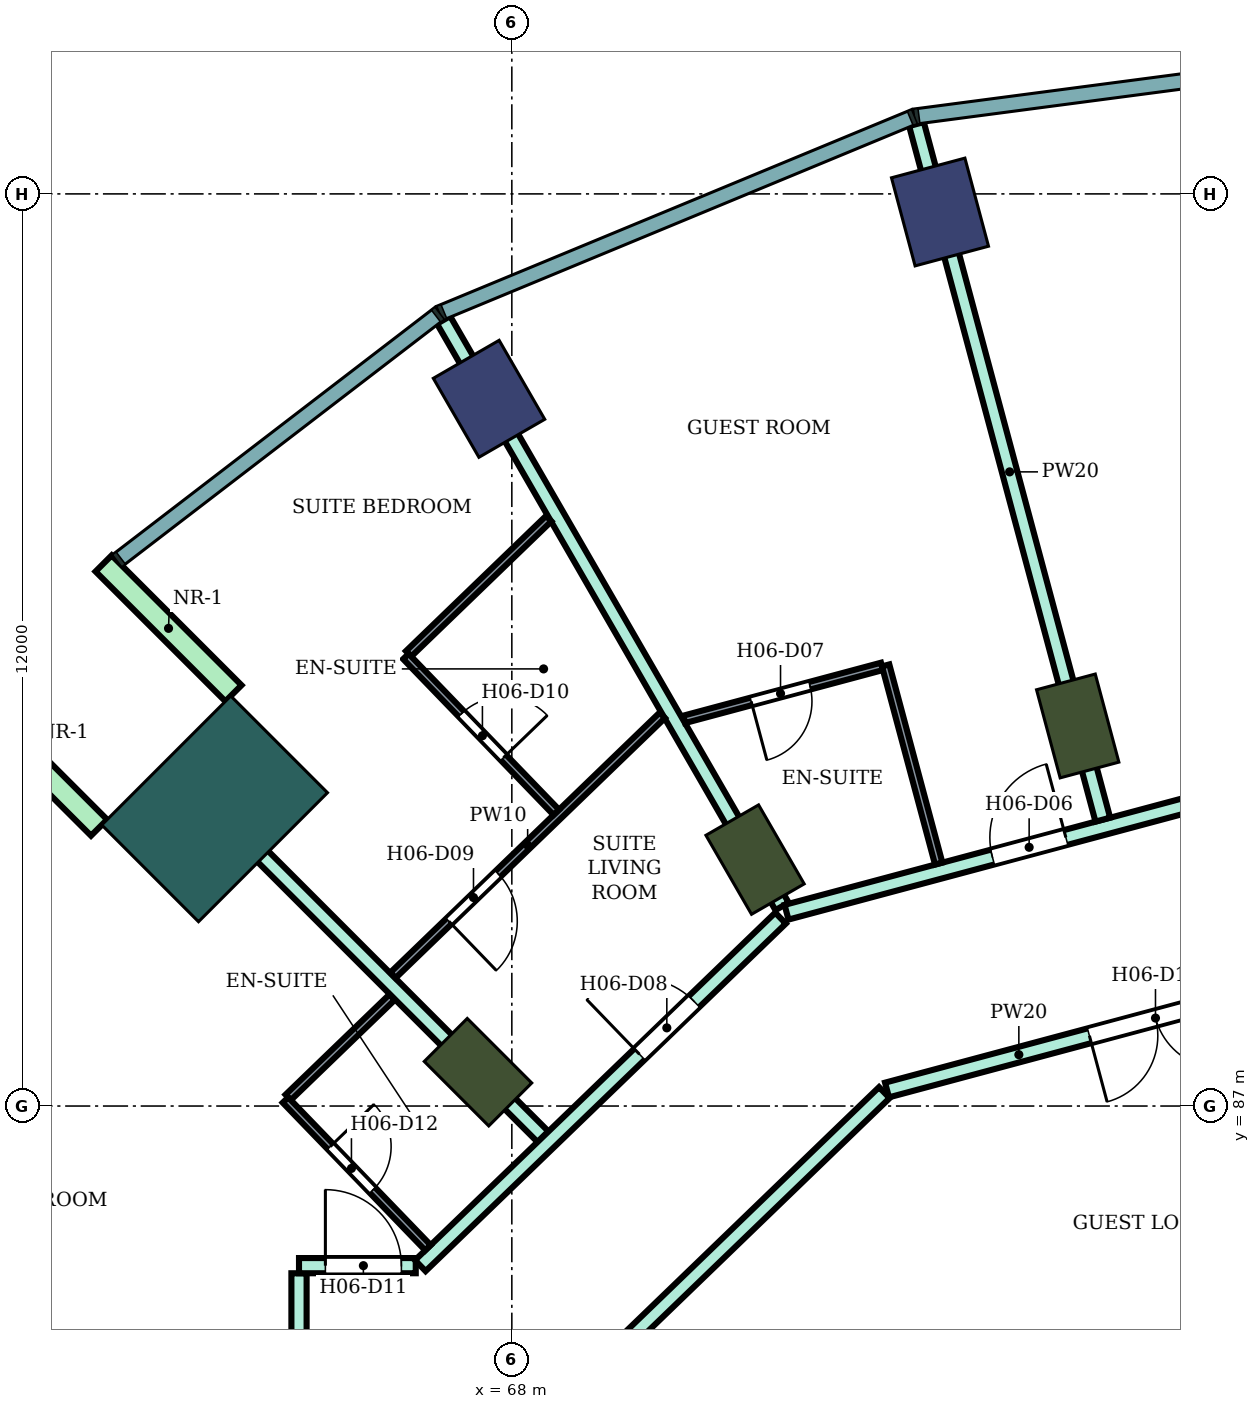
"""IFC4 building model, lengths in metres.
Left out: names, types, materials, properties, quantities, classifications, styles, units other than length and angle.
Written with IfcOpenShell. Run it as: python <this file> out.ifc"""

import sys

from ifc_helpers import new_model, si_unit, direction, frame, frame_2d, origin, origin_2d, place, context, subcontext, project, spatial, rectangle, extrude, element, fill, save


model = new_model("IFC4")
c1 = context("Model", 3, precision=1e-05, world=origin(), true_north=direction((0.0, 1.0)))
c2 = subcontext(c1, "Body", "Model", "MODEL_VIEW")
j1 = project(units=[si_unit("LENGTHUNIT", "METRE"), si_unit("PLANEANGLEUNIT", "RADIAN")], contexts=[c1])
p1 = place(None, origin())
s1 = spatial("IfcSite", under=j1, at=p1, CompositionType="ELEMENT")
p2 = place(p1, origin())
s2 = spatial("IfcBuilding", under=s1, at=p2, CompositionType="ELEMENT")
p3 = place(p2, frame((0.0, 0.0, 93.8)))
s3 = spatial("IfcBuildingStorey", under=s2, at=p3, CompositionType="ELEMENT", Elevation=93.8)
for number, where, z_axis, x_axis in (
    (1, (73.633, 98.762, 0.0), (0.0, 0.0, 1.0), (-0.259, 0.966, 0.0)),
    (2, (67.7, 96.304, 0.0), (0.0, 0.0, 1.0), (-0.5, 0.866, 0.0)),
):
    element("IfcColumn", number, at=place(p3, frame(where, z_axis=z_axis, x_axis=x_axis)), inside=s3, PredefinedType="COLUMN", context=c2, shape_type="SweptSolid", body=[
        extrude(rectangle(XDim=1.2, YDim=1.0, at=origin_2d()), origin(), (0.0, 0.0, 1.0), 3.8),
    ])
for number, where, z_axis, x_axis in (
    (3, (75.445, 92.0, 0.0), (0.0, 0.0, 1.0), (-0.259, 0.966, 0.0)),
    (4, (71.2, 90.242, 0.0), (0.0, 0.0, 1.0), (-0.5, 0.866, 0.0)),
    (5, (67.555, 87.445, 0.0), (0.0, 0.0, 1.0), (-0.707, 0.707, 0.0)),
):
    element("IfcColumn", number, at=place(p3, frame(where, z_axis=z_axis, x_axis=x_axis)), inside=s3, PredefinedType="COLUMN", context=c2, shape_type="SweptSolid", body=[
        extrude(rectangle(XDim=1.2, YDim=0.8, at=origin_2d()), origin(), (0.0, 0.0, 1.0), 3.8),
    ])
p4 = place(p3, frame((64.09, 90.91, 0.0), z_axis=(0.0, 0.0, 1.0), x_axis=(-0.707106781187, 0.707106781187, 0.0)))
e6 = element("IfcColumn", 6, at=p4, inside=s3, PredefinedType="COLUMN", context=c2, shape_type="SweptSolid", body=[
    extrude(rectangle(XDim=1.8, YDim=2.4, at=origin_2d()), origin(), (0.0, 0.0, 1.0), 3.8),
])
for number, where, z_axis, x_axis in (
    (7, (64.338, 92.43, 0.0), (0.0, 0.0, 1.0), (-0.707, 0.707, 0.0)),
    (8, (62.57, 90.662, 0.0), (0.0, 0.0, 1.0), (-0.707, 0.707, 0.0)),
):
    element("IfcWall", number, at=place(p3, frame(where, z_axis=z_axis, x_axis=x_axis)), inside=s3, PredefinedType="NOTDEFINED", context=c2, shape_type="SweptSolid", body=[
        extrude(rectangle(XDim=2.416, YDim=0.3, at=frame_2d((1.208, 0.0))), origin(), (0.0, 0.0, 1.0), 3.8),
    ])
p5 = place(p3, frame((63.6, 91.409, 0.0), z_axis=(0.0, 0.0, 1.0), x_axis=(0.706945318761, -0.707268206752, 0.0)))
e9 = element("IfcWall", 9, at=p5, inside=s3, PredefinedType="PARTITIONING", context=c2, shape_type="SweptSolid", body=[
    extrude(rectangle(XDim=6.805, YDim=0.2, at=frame_2d((3.402, 0.0))), origin(), (0.0, 0.0, 1.0), 3.35),
])
p6 = place(p3, frame((65.2, 83.401, 0.0), z_axis=(0.0, 0.0, 1.0), x_axis=(0.0, 1.0, 0.0)))
e10 = element("IfcWall", 10, at=p6, inside=s3, PredefinedType="PARTITIONING", context=c2, shape_type="SweptSolid", body=[
    extrude(rectangle(XDim=1.399, YDim=0.2, at=frame_2d((0.7, 0.0))), origin(), (0.0, 0.0, 1.0), 3.35),
])
p7 = place(p3, frame((65.2, 84.9, 0.0), z_axis=(0.0, 0.0, 1.0), x_axis=(1.0, 0.0, 0.0)))
e11 = element("IfcWall", 11, at=p7, inside=s3, PredefinedType="PARTITIONING", context=c2, shape_type="SweptSolid", body=[
    extrude(rectangle(XDim=1.536, YDim=0.2, at=frame_2d((0.768, 0.0))), origin(), (0.0, 0.0, 1.0), 3.35),
])
p8 = place(p7, frame((0.347, 0.0, 0.0)))
e12 = element("IfcOpeningElement", 12, at=p8, cuts=e11, PredefinedType="OPENING", context=c2, shape_type="SweptSolid", body=[
    extrude(rectangle(XDim=1.0, YDim=2.1, at=frame_2d((0.5, 1.05))), frame((0.0, 0.11, 0.0), z_axis=(0.0, -1.0, 0.0), x_axis=(1.0, 0.0, 0.0)), (0.0, 0.0, 1.0), 0.22),
])
p9 = place(p3, frame((66.796, 84.9, 0.0), z_axis=(0.0, 0.0, 1.0), x_axis=(0.719690784855, 0.694294731505, 0.0)))
e13 = element("IfcWall", 13, at=p9, inside=s3, PredefinedType="PARTITIONING", context=c2, shape_type="SweptSolid", body=[
    extrude(rectangle(XDim=6.585, YDim=0.2, at=frame_2d((3.292, 0.0))), origin(), (0.0, 0.0, 1.0), 3.35),
])
p10 = place(p9, frame((4.006, 0.0, 0.0)))
e14 = element("IfcOpeningElement", 14, at=p10, cuts=e13, PredefinedType="OPENING", context=c2, shape_type="SweptSolid", body=[
    extrude(rectangle(XDim=1.0, YDim=2.1, at=frame_2d((0.5, 1.05))), frame((0.0, 0.11, 0.0), z_axis=(0.0, -1.0, 0.0), x_axis=(1.0, 0.0, 0.0)), (0.0, 0.0, 1.0), 0.22),
])
p11 = place(p3, frame((67.102, 97.342, 0.0), z_axis=(0.0, 0.0, 1.0), x_axis=(0.499900389553, -0.866082906265, 0.0)))
e15 = element("IfcWall", 15, at=p11, inside=s3, PredefinedType="PARTITIONING", context=c2, shape_type="SweptSolid", body=[
    extrude(rectangle(XDim=8.908, YDim=0.2, at=frame_2d((4.454, 0.0))), origin(), (0.0, 0.0, 1.0), 3.35),
])
p12 = place(p3, frame((68.987, 83.4, 0.0), z_axis=(0.0, 0.0, 1.0), x_axis=(0.719586298962, 0.694403022997, 0.0)))
e16 = element("IfcWall", 16, at=p12, inside=s3, PredefinedType="PARTITIONING", context=c2, shape_type="SweptSolid", body=[
    extrude(rectangle(XDim=5.439, YDim=0.2, at=frame_2d((2.719, 0.0))), origin(), (0.0, 0.0, 1.0), 3.35),
])
p13 = place(p3, frame((71.614, 89.55, 0.0), z_axis=(0.0, 0.0, 1.0), x_axis=(0.965982378603, 0.258607896685, 0.0)))
e17 = element("IfcWall", 17, at=p13, inside=s3, PredefinedType="PARTITIONING", context=c2, shape_type="SweptSolid", body=[
    extrude(rectangle(XDim=8.632, YDim=0.2, at=frame_2d((4.316, 0.0))), origin(), (0.0, 0.0, 1.0), 3.35),
])
p14 = place(p13, frame((2.804, 0.0, 0.0)))
e18 = element("IfcOpeningElement", 18, at=p14, cuts=e17, PredefinedType="OPENING", context=c2, shape_type="SweptSolid", body=[
    extrude(rectangle(XDim=1.0, YDim=2.1, at=frame_2d((0.5, 1.05))), frame((0.0, 0.11, 0.0), z_axis=(0.0, -1.0, 0.0), x_axis=(1.0, 0.0, 0.0)), (0.0, 0.0, 1.0), 0.22),
])
p15 = place(p3, frame((72.936, 87.211, 0.0), z_axis=(0.0, 0.0, 1.0), x_axis=(0.965917703859, 0.258849356521, 0.0)))
e19 = element("IfcWall", 19, at=p15, inside=s3, PredefinedType="PARTITIONING", context=c2, shape_type="SweptSolid", body=[
    extrude(rectangle(XDim=7.182, YDim=0.2, at=frame_2d((3.591, 0.0))), origin(), (0.0, 0.0, 1.0), 3.35),
])
p16 = place(p15, frame((2.757, 0.0, 0.0)))
e20 = element("IfcOpeningElement", 20, at=p16, cuts=e19, PredefinedType="OPENING", context=c2, shape_type="SweptSolid", body=[
    extrude(rectangle(XDim=1.8, YDim=2.1, at=frame_2d((0.9, 1.05))), frame((0.0, 0.11, 0.0), z_axis=(0.0, -1.0, 0.0), x_axis=(1.0, 0.0, 0.0)), (0.0, 0.0, 1.0), 0.22),
])
p17 = place(p3, frame((73.323, 99.918, 0.0), z_axis=(0.0, 0.0, 1.0), x_axis=(0.258812513968, -0.965927576278, 0.0)))
e21 = element("IfcWall", 21, at=p17, inside=s3, PredefinedType="PARTITIONING", context=c2, shape_type="SweptSolid", body=[
    extrude(rectangle(XDim=9.474, YDim=0.2, at=frame_2d((4.737, 0.0))), origin(), (0.0, 0.0, 1.0), 3.35),
])
p18 = place(p3, frame((65.058, 87.114, 0.0), z_axis=(0.0, 0.0, 1.0), x_axis=(0.719653890619, 0.694332973232, 0.0)))
e22 = element("IfcWall", 22, at=p18, inside=s3, PredefinedType="PARTITIONING", context=c2, shape_type="SweptSolid", body=[
    extrude(rectangle(XDim=1.899, YDim=0.1, at=frame_2d((0.95, 0.0))), origin(), (0.0, 0.0, 1.0), 3.35),
])
p19 = place(p3, frame((65.022, 87.079, 0.0), z_axis=(0.0, 0.0, 1.0), x_axis=(0.694287838235, -0.719697434815, 0.0)))
e23 = element("IfcWall", 23, at=p19, inside=s3, PredefinedType="PARTITIONING", context=c2, shape_type="SweptSolid", body=[
    extrude(rectangle(XDim=2.7, YDim=0.1, at=frame_2d((1.35, 0.0))), origin(), (0.0, 0.0, 1.0), 3.35),
])
p20 = place(p19, frame((0.85, 0.0, 0.0)))
e24 = element("IfcOpeningElement", 24, at=p20, cuts=e23, PredefinedType="OPENING", context=c2, shape_type="SweptSolid", body=[
    extrude(rectangle(XDim=0.8, YDim=2.1, at=frame_2d((0.4, 1.05))), frame((0.0, 0.06, 0.0), z_axis=(0.0, -1.0, 0.0), x_axis=(1.0, 0.0, 0.0)), (0.0, 0.0, 1.0), 0.12),
])
p21 = place(p3, frame((66.436, 88.72, 0.0), z_axis=(0.0, 0.0, 1.0), x_axis=(0.719585934284, 0.694403400899, 0.0)))
e25 = element("IfcWall", 25, at=p21, inside=s3, PredefinedType="PARTITIONING", context=c2, shape_type="SweptSolid", body=[
    extrude(rectangle(XDim=4.925, YDim=0.1, at=frame_2d((2.462, 0.0))), origin(), (0.0, 0.0, 1.0), 3.35),
])
p22 = place(p21, frame((1.022, 0.0, 0.0)))
e26 = element("IfcOpeningElement", 26, at=p22, cuts=e25, PredefinedType="OPENING", context=c2, shape_type="SweptSolid", body=[
    extrude(rectangle(XDim=0.9, YDim=2.1, at=frame_2d((0.45, 1.05))), frame((0.0, 0.06, 0.0), z_axis=(0.0, -1.0, 0.0), x_axis=(1.0, 0.0, 0.0)), (0.0, 0.0, 1.0), 0.12),
])
p23 = place(p3, frame((66.642, 92.95, 0.0), z_axis=(0.0, 0.0, 1.0), x_axis=(0.719667412702, 0.694318957753, 0.0)))
e27 = element("IfcWall", 27, at=p23, inside=s3, PredefinedType="PARTITIONING", context=c2, shape_type="SweptSolid", body=[
    extrude(rectangle(XDim=2.562, YDim=0.1, at=frame_2d((1.281, 0.0))), origin(), (0.0, 0.0, 1.0), 3.35),
])
p24 = place(p3, frame((66.606, 92.915, 0.0), z_axis=(0.0, 0.0, 1.0), x_axis=(0.694403413121, -0.71958592249, 0.0)))
e28 = element("IfcWall", 28, at=p24, inside=s3, PredefinedType="PARTITIONING", context=c2, shape_type="SweptSolid", body=[
    extrude(rectangle(XDim=2.85, YDim=0.1, at=frame_2d((1.425, 0.0))), origin(), (0.0, 0.0, 1.0), 3.35),
])
p25 = place(p24, frame((1.05, 0.0, 0.0)))
e29 = element("IfcOpeningElement", 29, at=p25, cuts=e28, PredefinedType="OPENING", context=c2, shape_type="SweptSolid", body=[
    extrude(rectangle(XDim=0.8, YDim=2.1, at=frame_2d((0.4, 1.05))), frame((0.0, 0.06, 0.0), z_axis=(0.0, -1.0, 0.0), x_axis=(1.0, 0.0, 0.0)), (0.0, 0.0, 1.0), 0.12),
])
p26 = place(p3, frame((70.268, 92.087, 0.0), z_axis=(0.0, 0.0, 1.0), x_axis=(0.965937937835, 0.258773839966, 0.0)))
e30 = element("IfcWall", 30, at=p26, inside=s3, PredefinedType="PARTITIONING", context=c2, shape_type="SweptSolid", body=[
    extrude(rectangle(XDim=2.694, YDim=0.1, at=frame_2d((1.347, 0.0))), origin(), (0.0, 0.0, 1.0), 3.35),
])
p27 = place(p26, frame((0.912, 0.0, 0.0)))
e31 = element("IfcOpeningElement", 31, at=p27, cuts=e30, PredefinedType="OPENING", context=c2, shape_type="SweptSolid", body=[
    extrude(rectangle(XDim=0.8, YDim=2.1, at=frame_2d((0.4, 1.05))), frame((0.0, 0.06, 0.0), z_axis=(0.0, -1.0, 0.0), x_axis=(1.0, 0.0, 0.0)), (0.0, 0.0, 1.0), 0.12),
])
p28 = place(p3, frame((72.918, 92.797, 0.0), z_axis=(0.0, 0.0, 1.0), x_axis=(0.25867580527, -0.965964195904, 0.0)))
e32 = element("IfcWall", 32, at=p28, inside=s3, PredefinedType="PARTITIONING", context=c2, shape_type="SweptSolid", body=[
    extrude(rectangle(XDim=2.699, YDim=0.1, at=frame_2d((1.35, 0.0))), origin(), (0.0, 0.0, 1.0), 3.35),
])
p29 = place(p14, origin())
e33 = element("IfcDoor", 33, at=p29, inside=s3, OperationType="SINGLE_SWING_RIGHT", PredefinedType="DOOR", context=c2, shape_type="SweptSolid", body=[
    extrude(rectangle(XDim=1.0, YDim=2.1, at=frame_2d((0.5, 1.05))), frame((0.0, 0.025, 0.0), z_axis=(0.0, -1.0, 0.0), x_axis=(1.0, 0.0, 0.0)), (0.0, 0.0, 1.0), 0.05),
])
fill(e18, e33)
p30 = place(p27, frame((0.8, 0.0, 0.0), z_axis=(0.0, 0.0, 1.0), x_axis=(-1.0, 0.0, 0.0)))
e34 = element("IfcDoor", 34, at=p30, inside=s3, OperationType="SINGLE_SWING_RIGHT", PredefinedType="DOOR", context=c2, shape_type="SweptSolid", body=[
    extrude(rectangle(XDim=0.8, YDim=2.1, at=frame_2d((0.4, 1.05))), frame((0.0, 0.025, 0.0), z_axis=(0.0, -1.0, 0.0), x_axis=(1.0, 0.0, 0.0)), (0.0, 0.0, 1.0), 0.05),
])
fill(e31, e34)
p31 = place(p10, origin())
e35 = element("IfcDoor", 35, at=p31, inside=s3, OperationType="SINGLE_SWING_LEFT", PredefinedType="DOOR", context=c2, shape_type="SweptSolid", body=[
    extrude(rectangle(XDim=1.0, YDim=2.1, at=frame_2d((0.5, 1.05))), frame((0.0, 0.025, 0.0), z_axis=(0.0, -1.0, 0.0), x_axis=(1.0, 0.0, 0.0)), (0.0, 0.0, 1.0), 0.05),
])
fill(e14, e35)
p32 = place(p22, frame((0.9, 0.0, 0.0), z_axis=(0.0, 0.0, 1.0), x_axis=(-1.0, 0.0, 0.0)))
e36 = element("IfcDoor", 36, at=p32, inside=s3, OperationType="SINGLE_SWING_RIGHT", PredefinedType="DOOR", context=c2, shape_type="SweptSolid", body=[
    extrude(rectangle(XDim=0.9, YDim=2.1, at=frame_2d((0.45, 1.05))), frame((0.0, 0.025, 0.0), z_axis=(0.0, -1.0, 0.0), x_axis=(1.0, 0.0, 0.0)), (0.0, 0.0, 1.0), 0.05),
])
fill(e26, e36)
p33 = place(p25, origin())
e37 = element("IfcDoor", 37, at=p33, inside=s3, OperationType="SINGLE_SWING_RIGHT", PredefinedType="DOOR", context=c2, shape_type="SweptSolid", body=[
    extrude(rectangle(XDim=0.8, YDim=2.1, at=frame_2d((0.4, 1.05))), frame((0.0, 0.025, 0.0), z_axis=(0.0, -1.0, 0.0), x_axis=(1.0, 0.0, 0.0)), (0.0, 0.0, 1.0), 0.05),
])
fill(e29, e37)
p34 = place(p8, origin())
e38 = element("IfcDoor", 38, at=p34, inside=s3, OperationType="SINGLE_SWING_LEFT", PredefinedType="DOOR", context=c2, shape_type="SweptSolid", body=[
    extrude(rectangle(XDim=1.0, YDim=2.1, at=frame_2d((0.5, 1.05))), frame((0.0, 0.025, 0.0), z_axis=(0.0, -1.0, 0.0), x_axis=(1.0, 0.0, 0.0)), (0.0, 0.0, 1.0), 0.05),
])
fill(e12, e38)
p35 = place(p20, origin())
e39 = element("IfcDoor", 39, at=p35, inside=s3, OperationType="SINGLE_SWING_LEFT", PredefinedType="DOOR", context=c2, shape_type="SweptSolid", body=[
    extrude(rectangle(XDim=0.8, YDim=2.1, at=frame_2d((0.4, 1.05))), frame((0.0, 0.025, 0.0), z_axis=(0.0, -1.0, 0.0), x_axis=(1.0, 0.0, 0.0)), (0.0, 0.0, 1.0), 0.05),
])
fill(e24, e39)
p36 = place(p16, frame((1.8, 0.0, 0.0), z_axis=(0.0, 0.0, 1.0), x_axis=(-1.0, 0.0, 0.0)))
e40 = element("IfcDoor", 40, at=p36, inside=s3, OperationType="DOUBLE_DOOR_SINGLE_SWING", PredefinedType="DOOR", context=c2, shape_type="SweptSolid", body=[
    extrude(rectangle(XDim=1.8, YDim=2.1, at=frame_2d((0.9, 1.05))), frame((0.0, 0.025, 0.0), z_axis=(0.0, -1.0, 0.0), x_axis=(1.0, 0.0, 0.0)), (0.0, 0.0, 1.0), 0.05),
])
fill(e20, e40)
save(model, sys.argv[1])
